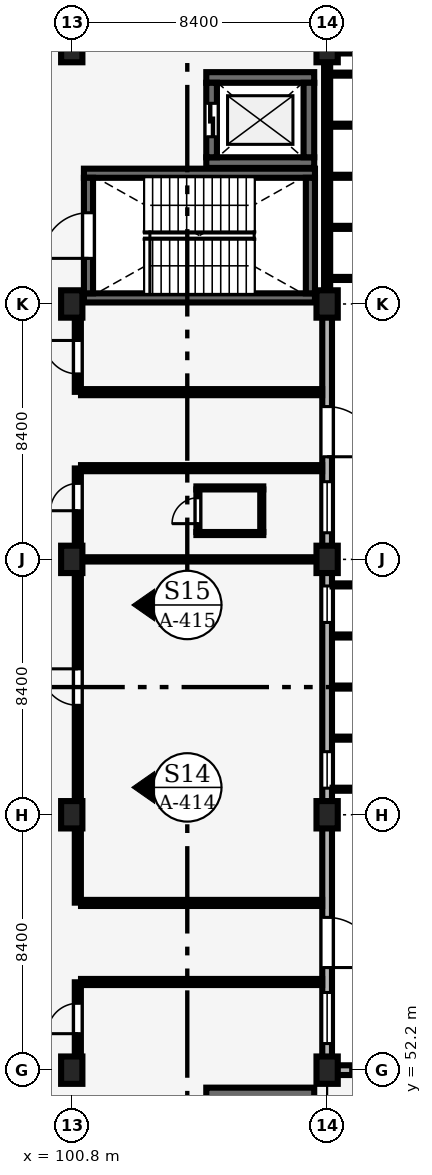
"""IFC4 building model, lengths in metres.
Left out: names, types, materials, properties, quantities, classifications, styles, units other than length and angle.
Written with IfcOpenShell. Run it as: python <this file> out.ifc"""

import sys

from ifc_helpers import new_model, si_unit, direction, frame, frame_2d, origin, origin_2d, place, context, subcontext, project, spatial, rectangle, extrude, element, fill, save


model = new_model("IFC4")
c1 = context("Model", 3, precision=1e-05, world=origin(), true_north=direction((0.0, 1.0)))
c2 = subcontext(c1, "Body", "Model", "MODEL_VIEW")
j1 = project(units=[si_unit("LENGTHUNIT", "METRE"), si_unit("PLANEANGLEUNIT", "RADIAN")], contexts=[c1])
p1 = place(None, origin())
s1 = spatial("IfcSite", under=j1, at=p1, CompositionType="ELEMENT")
p2 = place(p1, origin())
s2 = spatial("IfcBuilding", under=s1, at=p2, CompositionType="ELEMENT")
p3 = place(p2, origin())
s3 = spatial("IfcBuildingStorey", under=s2, at=p3, CompositionType="ELEMENT", Elevation=0.0)
for number, where, z_axis, x_axis in (
    (1, (100.8, 52.2, 0.0), (0.0, 0.0, 1.0), (1.0, 0.0, 0.0)),
    (2, (100.8, 60.6, 0.0), (0.0, 0.0, 1.0), (1.0, 0.0, 0.0)),
    (3, (100.8, 69.0, 0.0), (0.0, 0.0, 1.0), (1.0, 0.0, 0.0)),
    (4, (100.8, 77.4, 0.0), (0.0, 0.0, 1.0), (1.0, 0.0, 0.0)),
    (5, (100.8, 85.8, 0.0), (0.0, 0.0, 1.0), (1.0, 0.0, 0.0)),
    (6, (109.2, 52.2, 0.0), (0.0, 0.0, 1.0), (1.0, 0.0, 0.0)),
    (7, (109.2, 60.6, 0.0), (0.0, 0.0, 1.0), (1.0, 0.0, 0.0)),
    (8, (109.2, 69.0, 0.0), (0.0, 0.0, 1.0), (1.0, 0.0, 0.0)),
    (9, (109.2, 77.4, 0.0), (0.0, 0.0, 1.0), (1.0, 0.0, 0.0)),
    (10, (109.2, 85.8, 0.0), (0.0, 0.0, 1.0), (1.0, 0.0, 0.0)),
):
    element("IfcColumn", number, at=place(p3, frame(where, z_axis=z_axis, x_axis=x_axis)), inside=s3, PredefinedType="COLUMN", context=c2, shape_type="SweptSolid", body=[
        extrude(rectangle(XDim=0.7, YDim=0.9, at=origin_2d()), origin(), (0.0, 0.0, 1.0), 4.8),
    ])
p4 = place(p3, frame((109.525, 52.2, 0.0), z_axis=(0.0, 0.0, 1.0), x_axis=(1.0, 0.0, 0.0)))
e11 = element("IfcWall", 11, at=p4, inside=s3, PredefinedType="SOLIDWALL", context=c2, shape_type="SweptSolid", body=[
    extrude(rectangle(XDim=7.85, YDim=0.32, at=frame_2d((3.925, 0.0))), origin(), (0.0, 0.0, 1.0), 4.03),
])
p5 = place(p4, frame((0.45, 0.0, 0.9)))
e12 = element("IfcOpeningElement", 12, at=p5, cuts=e11, PredefinedType="OPENING", context=c2, shape_type="SweptSolid", body=[
    extrude(rectangle(XDim=1.2, YDim=1.5, at=frame_2d((0.6, 0.75))), frame((0.0, 0.17, 0.0), z_axis=(0.0, -1.0, 0.0), x_axis=(1.0, 0.0, 0.0)), (0.0, 0.0, 1.0), 0.34),
])
p6 = place(p4, frame((6.2, 0.0, 0.9)))
e13 = element("IfcOpeningElement", 13, at=p6, cuts=e11, PredefinedType="OPENING", context=c2, shape_type="SweptSolid", body=[
    extrude(rectangle(XDim=1.2, YDim=1.8, at=frame_2d((0.6, 0.9))), frame((0.0, 0.17, 0.0), z_axis=(0.0, -1.0, 0.0), x_axis=(1.0, 0.0, 0.0)), (0.0, 0.0, 1.0), 0.34),
])
p7 = place(p3, frame((109.2, 52.625, 0.0), z_axis=(0.0, 0.0, 1.0), x_axis=(0.0, 1.0, 0.0)))
e14 = element("IfcWall", 14, at=p7, inside=s3, PredefinedType="SOLIDWALL", context=c2, shape_type="SweptSolid", body=[
    extrude(rectangle(XDim=7.55, YDim=0.32, at=frame_2d((3.775, 0.0))), origin(), (0.0, 0.0, 1.0), 3.89),
])
p8 = place(p7, frame((4.6, 0.0, 0.0), z_axis=(0.0, 0.0, 1.0), x_axis=(-1.0, 0.0, 0.0)))
e15 = element("IfcOpeningElement", 15, at=p8, cuts=e14, PredefinedType="OPENING", context=c2, shape_type="SweptSolid", body=[
    extrude(rectangle(XDim=1.65, YDim=2.25, at=frame_2d((0.825, 1.125))), frame((0.0, 0.17, 0.0), z_axis=(0.0, -1.0, 0.0), x_axis=(1.0, 0.0, 0.0)), (0.0, 0.0, 1.0), 0.34),
])
p9 = place(p7, frame((0.45, 0.0, 0.95)))
e16 = element("IfcOpeningElement", 16, at=p9, cuts=e14, PredefinedType="OPENING", context=c2, shape_type="SweptSolid", body=[
    extrude(rectangle(XDim=1.68, YDim=2.1, at=frame_2d((0.84, 1.05))), frame((0.0, 0.17, 0.0), z_axis=(0.0, -1.0, 0.0), x_axis=(1.0, 0.0, 0.0)), (0.0, 0.0, 1.0), 0.34),
])
p10 = place(p3, frame((109.2, 61.025, 0.0), z_axis=(0.0, 0.0, 1.0), x_axis=(0.0, 1.0, 0.0)))
e17 = element("IfcWall", 17, at=p10, inside=s3, PredefinedType="SOLIDWALL", context=c2, shape_type="SweptSolid", body=[
    extrude(rectangle(XDim=7.55, YDim=0.32, at=frame_2d((3.775, 0.0))), origin(), (0.0, 0.0, 1.0), 3.84),
])
p11 = place(p10, frame((0.45, 0.0, 0.85)))
e18 = element("IfcOpeningElement", 18, at=p11, cuts=e17, PredefinedType="OPENING", context=c2, shape_type="SweptSolid", body=[
    extrude(rectangle(XDim=1.2, YDim=1.8, at=frame_2d((0.6, 0.9))), frame((0.0, 0.17, 0.0), z_axis=(0.0, -1.0, 0.0), x_axis=(1.0, 0.0, 0.0)), (0.0, 0.0, 1.0), 0.34),
])
p12 = place(p10, frame((5.9, 0.0, 0.85)))
e19 = element("IfcOpeningElement", 19, at=p12, cuts=e17, PredefinedType="OPENING", context=c2, shape_type="SweptSolid", body=[
    extrude(rectangle(XDim=1.2, YDim=1.8, at=frame_2d((0.6, 0.9))), frame((0.0, 0.17, 0.0), z_axis=(0.0, -1.0, 0.0), x_axis=(1.0, 0.0, 0.0)), (0.0, 0.0, 1.0), 0.34),
])
p13 = place(p3, frame((109.2, 69.425, 0.0), z_axis=(0.0, 0.0, 1.0), x_axis=(0.0, 1.0, 0.0)))
e20 = element("IfcWall", 20, at=p13, inside=s3, PredefinedType="SOLIDWALL", context=c2, shape_type="SweptSolid", body=[
    extrude(rectangle(XDim=7.55, YDim=0.32, at=frame_2d((3.775, 0.0))), origin(), (0.0, 0.0, 1.0), 3.89),
])
p14 = place(p13, frame((4.6, 0.0, 0.0), z_axis=(0.0, 0.0, 1.0), x_axis=(-1.0, 0.0, 0.0)))
e21 = element("IfcOpeningElement", 21, at=p14, cuts=e20, PredefinedType="OPENING", context=c2, shape_type="SweptSolid", body=[
    extrude(rectangle(XDim=1.65, YDim=2.25, at=frame_2d((0.825, 1.125))), frame((0.0, 0.17, 0.0), z_axis=(0.0, -1.0, 0.0), x_axis=(1.0, 0.0, 0.0)), (0.0, 0.0, 1.0), 0.34),
])
p15 = place(p13, frame((0.45, 0.0, 0.95)))
e22 = element("IfcOpeningElement", 22, at=p15, cuts=e20, PredefinedType="OPENING", context=c2, shape_type="SweptSolid", body=[
    extrude(rectangle(XDim=1.68, YDim=2.1, at=frame_2d((0.84, 1.05))), frame((0.0, 0.17, 0.0), z_axis=(0.0, -1.0, 0.0), x_axis=(1.0, 0.0, 0.0)), (0.0, 0.0, 1.0), 0.34),
])
p16 = place(p3, frame((109.525, 85.8, 0.0), z_axis=(0.0, 0.0, 1.0), x_axis=(1.0, 0.0, 0.0)))
e23 = element("IfcWall", 23, at=p16, inside=s3, PredefinedType="SOLIDWALL", context=c2, shape_type="SweptSolid", body=[
    extrude(rectangle(XDim=7.85, YDim=0.32, at=frame_2d((3.925, 0.0))), origin(), (0.0, 0.0, 1.0), 3.92),
])
p17 = place(p16, frame((0.45, 0.0, 0.9)))
e24 = element("IfcOpeningElement", 24, at=p17, cuts=e23, PredefinedType="OPENING", context=c2, shape_type="SweptSolid", body=[
    extrude(rectangle(XDim=1.68, YDim=2.4, at=frame_2d((0.84, 1.2))), frame((0.0, 0.17, 0.0), z_axis=(0.0, -1.0, 0.0), x_axis=(1.0, 0.0, 0.0)), (0.0, 0.0, 1.0), 0.34),
])
p18 = place(p16, frame((6.2, 0.0, 0.9)))
e25 = element("IfcOpeningElement", 25, at=p18, cuts=e23, PredefinedType="OPENING", context=c2, shape_type="SweptSolid", body=[
    extrude(rectangle(XDim=1.2, YDim=1.5, at=frame_2d((0.6, 0.75))), frame((0.0, 0.17, 0.0), z_axis=(0.0, -1.0, 0.0), x_axis=(1.0, 0.0, 0.0)), (0.0, 0.0, 1.0), 0.34),
])
p19 = place(p3, frame((105.225, 51.45, 0.0), z_axis=(0.0, 0.0, 1.0), x_axis=(1.0, 0.0, 0.0)))
e26 = element("IfcWall", 26, at=p19, inside=s3, PredefinedType="SHEAR", context=c2, shape_type="SweptSolid", body=[
    extrude(rectangle(XDim=3.55, YDim=0.35, at=frame_2d((1.775, 0.0))), origin(), (0.0, 0.0, 1.0), 4.52),
])
for number, where, z_axis, x_axis in (
    (27, (101.2, 77.6, 0.0), (0.0, 0.0, 1.0), (1.0, 0.0, 0.0)),
    (28, (101.2, 81.7, 0.0), (0.0, 0.0, 1.0), (1.0, 0.0, 0.0)),
):
    element("IfcWall", number, at=place(p3, frame(where, z_axis=z_axis, x_axis=x_axis)), inside=s3, PredefinedType="SHEAR", context=c2, shape_type="SweptSolid", body=[
        extrude(rectangle(XDim=7.6, YDim=0.3, at=frame_2d((3.8, 0.0))), origin(), (0.0, 0.0, 1.0), 4.625),
    ])
p20 = place(p3, frame((101.35, 77.75, 0.0), z_axis=(0.0, 0.0, 1.0), x_axis=(0.0, 1.0, 0.0)))
e29 = element("IfcWall", 29, at=p20, inside=s3, PredefinedType="SHEAR", context=c2, shape_type="SweptSolid", body=[
    extrude(rectangle(XDim=3.8, YDim=0.3, at=frame_2d((1.9, 0.0))), origin(), (0.0, 0.0, 1.0), 4.625),
])
p21 = place(p20, frame((1.15, 0.0, 0.0)))
e30 = element("IfcOpeningElement", 30, at=p21, cuts=e29, PredefinedType="OPENING", context=c2, shape_type="SweptSolid", body=[
    extrude(rectangle(XDim=1.5, YDim=2.2, at=frame_2d((0.75, 1.1))), frame((0.0, 0.16, 0.0), z_axis=(0.0, -1.0, 0.0), x_axis=(1.0, 0.0, 0.0)), (0.0, 0.0, 1.0), 0.32),
])
p22 = place(p3, frame((108.65, 77.75, 0.0), z_axis=(0.0, 0.0, 1.0), x_axis=(0.0, 1.0, 0.0)))
e31 = element("IfcWall", 31, at=p22, inside=s3, PredefinedType="SHEAR", context=c2, shape_type="SweptSolid", body=[
    extrude(rectangle(XDim=3.8, YDim=0.3, at=frame_2d((1.9, 0.0))), origin(), (0.0, 0.0, 1.0), 4.625),
])
for number, where, z_axis, x_axis in (
    (32, (105.225, 82.05, 0.0), (0.0, 0.0, 1.0), (1.0, 0.0, 0.0)),
    (33, (105.225, 84.85, 0.0), (0.0, 0.0, 1.0), (1.0, 0.0, 0.0)),
):
    element("IfcWall", number, at=place(p3, frame(where, z_axis=z_axis, x_axis=x_axis)), inside=s3, PredefinedType="SHEAR", context=c2, shape_type="SweptSolid", body=[
        extrude(rectangle(XDim=3.55, YDim=0.35, at=frame_2d((1.775, 0.0))), origin(), (0.0, 0.0, 1.0), 4.52),
    ])
p23 = place(p3, frame((105.4, 82.225, 0.0), z_axis=(0.0, 0.0, 1.0), x_axis=(0.0, 1.0, 0.0)))
e34 = element("IfcWall", 34, at=p23, inside=s3, PredefinedType="SHEAR", context=c2, shape_type="SweptSolid", body=[
    extrude(rectangle(XDim=2.45, YDim=0.35, at=frame_2d((1.225, 0.0))), origin(), (0.0, 0.0, 1.0), 4.52),
])
p24 = place(p23, frame((0.675, 0.0, 0.0)))
e35 = element("IfcOpeningElement", 35, at=p24, cuts=e34, PredefinedType="OPENING", context=c2, shape_type="SweptSolid", body=[
    extrude(rectangle(XDim=1.1, YDim=2.2, at=frame_2d((0.55, 1.1))), frame((0.0, 0.185, 0.0), z_axis=(0.0, -1.0, 0.0), x_axis=(1.0, 0.0, 0.0)), (0.0, 0.0, 1.0), 0.37),
])
p25 = place(p3, frame((108.6, 82.225, 0.0), z_axis=(0.0, 0.0, 1.0), x_axis=(0.0, 1.0, 0.0)))
e36 = element("IfcWall", 36, at=p25, inside=s3, PredefinedType="SHEAR", context=c2, shape_type="SweptSolid", body=[
    extrude(rectangle(XDim=2.45, YDim=0.35, at=frame_2d((1.225, 0.0))), origin(), (0.0, 0.0, 1.0), 4.52),
])
for number, where, z_axis, x_axis in (
    (37, (104.9, 69.85, 0.0), (0.0, 0.0, 1.0), (1.0, 0.0, 0.0)),
    (38, (104.9, 71.35, 0.0), (0.0, 0.0, 1.0), (1.0, 0.0, 0.0)),
):
    element("IfcWall", number, at=place(p3, frame(where, z_axis=z_axis, x_axis=x_axis)), inside=s3, PredefinedType="PARTITIONING", context=c2, shape_type="SweptSolid", body=[
        extrude(rectangle(XDim=2.2, YDim=0.1, at=frame_2d((1.1, 0.0))), origin(), (0.0, 0.0, 1.0), 4.5),
    ])
p26 = place(p3, frame((104.95, 69.9, 0.0), z_axis=(0.0, 0.0, 1.0), x_axis=(0.0, 1.0, 0.0)))
e39 = element("IfcWall", 39, at=p26, inside=s3, PredefinedType="PARTITIONING", context=c2, shape_type="SweptSolid", body=[
    extrude(rectangle(XDim=1.4, YDim=0.1, at=frame_2d((0.7, 0.0))), origin(), (0.0, 0.0, 1.0), 4.5),
])
p27 = place(p26, frame((0.275, 0.0, 0.0)))
e40 = element("IfcOpeningElement", 40, at=p27, cuts=e39, PredefinedType="OPENING", context=c2, shape_type="SweptSolid", body=[
    extrude(rectangle(XDim=0.85, YDim=2.05, at=frame_2d((0.425, 1.025))), frame((0.0, 0.06, 0.0), z_axis=(0.0, -1.0, 0.0), x_axis=(1.0, 0.0, 0.0)), (0.0, 0.0, 1.0), 0.12),
])
p28 = place(p3, frame((107.05, 69.9, 0.0), z_axis=(0.0, 0.0, 1.0), x_axis=(0.0, 1.0, 0.0)))
e41 = element("IfcWall", 41, at=p28, inside=s3, PredefinedType="PARTITIONING", context=c2, shape_type="SweptSolid", body=[
    extrude(rectangle(XDim=1.4, YDim=0.1, at=frame_2d((0.7, 0.0))), origin(), (0.0, 0.0, 1.0), 4.5),
])
p29 = place(p3, frame((101.0, 52.66, 0.0), z_axis=(0.0, 0.0, 1.0), x_axis=(0.0, 1.0, 0.0)))
e42 = element("IfcWall", 42, at=p29, inside=s3, PredefinedType="PARTITIONING", context=c2, shape_type="SweptSolid", body=[
    extrude(rectangle(XDim=2.43, YDim=0.2, at=frame_2d((1.215, 0.0))), origin(), (0.0, 0.0, 1.0), 3.74),
])
p30 = place(p29, frame((0.74, 0.0, 0.0)))
e43 = element("IfcOpeningElement", 43, at=p30, cuts=e42, PredefinedType="OPENING", context=c2, shape_type="SweptSolid", body=[
    extrude(rectangle(XDim=1.0, YDim=2.25, at=frame_2d((0.5, 1.125))), frame((0.0, 0.11, 0.0), z_axis=(0.0, -1.0, 0.0), x_axis=(1.0, 0.0, 0.0)), (0.0, 0.0, 1.0), 0.22),
])
for number, where, z_axis, x_axis in (
    (44, (101.105, 55.1, 0.0), (0.0, 0.0, 1.0), (1.0, 0.0, 0.0)),
    (45, (101.105, 57.7, 0.0), (0.0, 0.0, 1.0), (1.0, 0.0, 0.0)),
):
    element("IfcWall", number, at=place(p3, frame(where, z_axis=z_axis, x_axis=x_axis)), inside=s3, PredefinedType="PARTITIONING", context=c2, shape_type="SweptSolid", body=[
        extrude(rectangle(XDim=7.93, YDim=0.2, at=frame_2d((3.965, 0.0))), origin(), (0.0, 0.0, 1.0), 4.06),
    ])
p31 = place(p3, frame((101.105, 69.0, 0.0), z_axis=(0.0, 0.0, 1.0), x_axis=(1.0, 0.0, 0.0)))
e46 = element("IfcWall", 46, at=p31, inside=s3, PredefinedType="PARTITIONING", context=c2, shape_type="SweptSolid", body=[
    extrude(rectangle(XDim=7.93, YDim=0.14, at=frame_2d((3.965, 0.0))), origin(), (0.0, 0.0, 1.0), 3.89),
])
p32 = place(p3, frame((101.0, 57.71, 0.0), z_axis=(0.0, 0.0, 1.0), x_axis=(0.0, 1.0, 0.0)))
e47 = element("IfcWall", 47, at=p32, inside=s3, PredefinedType="PARTITIONING", context=c2, shape_type="SweptSolid", body=[
    extrude(rectangle(XDim=2.43, YDim=0.2, at=frame_2d((1.215, 0.0))), origin(), (0.0, 0.0, 1.0), 3.74),
])
p33 = place(p3, frame((101.0, 61.06, 0.0), z_axis=(0.0, 0.0, 1.0), x_axis=(0.0, 1.0, 0.0)))
e48 = element("IfcWall", 48, at=p33, inside=s3, PredefinedType="PARTITIONING", context=c2, shape_type="SweptSolid", body=[
    extrude(rectangle(XDim=7.48, YDim=0.2, at=frame_2d((3.74, 0.0))), origin(), (0.0, 0.0, 1.0), 3.79),
])
p34 = place(p33, frame((3.14, 0.0, 0.0)))
e49 = element("IfcOpeningElement", 49, at=p34, cuts=e48, PredefinedType="OPENING", context=c2, shape_type="SweptSolid", body=[
    extrude(rectangle(XDim=1.2, YDim=2.2, at=frame_2d((0.6, 1.1))), frame((0.0, 0.11, 0.0), z_axis=(0.0, -1.0, 0.0), x_axis=(1.0, 0.0, 0.0)), (0.0, 0.0, 1.0), 0.22),
])
p35 = place(p3, frame((101.0, 69.46, 0.0), z_axis=(0.0, 0.0, 1.0), x_axis=(0.0, 1.0, 0.0)))
e50 = element("IfcWall", 50, at=p35, inside=s3, PredefinedType="PARTITIONING", context=c2, shape_type="SweptSolid", body=[
    extrude(rectangle(XDim=2.53, YDim=0.2, at=frame_2d((1.265, 0.0))), origin(), (0.0, 0.0, 1.0), 3.74),
])
p36 = place(p35, frame((1.14, 0.0, 0.0)))
e51 = element("IfcOpeningElement", 51, at=p36, cuts=e50, PredefinedType="OPENING", context=c2, shape_type="SweptSolid", body=[
    extrude(rectangle(XDim=0.9, YDim=2.1, at=frame_2d((0.45, 1.05))), frame((0.0, 0.11, 0.0), z_axis=(0.0, -1.0, 0.0), x_axis=(1.0, 0.0, 0.0)), (0.0, 0.0, 1.0), 0.22),
])
for number, where, z_axis, x_axis in (
    (52, (101.105, 72.0, 0.0), (0.0, 0.0, 1.0), (1.0, 0.0, 0.0)),
    (53, (101.105, 74.5, 0.0), (0.0, 0.0, 1.0), (1.0, 0.0, 0.0)),
):
    element("IfcWall", number, at=place(p3, frame(where, z_axis=z_axis, x_axis=x_axis)), inside=s3, PredefinedType="PARTITIONING", context=c2, shape_type="SweptSolid", body=[
        extrude(rectangle(XDim=7.93, YDim=0.2, at=frame_2d((3.965, 0.0))), origin(), (0.0, 0.0, 1.0), 4.06),
    ])
p37 = place(p3, frame((101.0, 74.51, 0.0), z_axis=(0.0, 0.0, 1.0), x_axis=(0.0, 1.0, 0.0)))
e54 = element("IfcWall", 54, at=p37, inside=s3, PredefinedType="PARTITIONING", context=c2, shape_type="SweptSolid", body=[
    extrude(rectangle(XDim=2.43, YDim=0.2, at=frame_2d((1.215, 0.0))), origin(), (0.0, 0.0, 1.0), 3.74),
])
p38 = place(p37, frame((0.59, 0.0, 0.0)))
e55 = element("IfcOpeningElement", 55, at=p38, cuts=e54, PredefinedType="OPENING", context=c2, shape_type="SweptSolid", body=[
    extrude(rectangle(XDim=1.1, YDim=2.15, at=frame_2d((0.55, 1.075))), frame((0.0, 0.11, 0.0), z_axis=(0.0, -1.0, 0.0), x_axis=(1.0, 0.0, 0.0)), (0.0, 0.0, 1.0), 0.22),
])
p39 = place(p5, origin())
e56 = element("IfcWindow", 56, at=p39, inside=s3, PartitioningType="SINGLE_PANEL", PredefinedType="WINDOW", context=c2, shape_type="SweptSolid", body=[
    extrude(rectangle(XDim=1.2, YDim=1.5, at=frame_2d((0.6, 0.75))), frame((0.0, 0.03, 0.0), z_axis=(0.0, -1.0, 0.0), x_axis=(1.0, 0.0, 0.0)), (0.0, 0.0, 1.0), 0.06),
])
fill(e12, e56)
p40 = place(p8, origin())
e57 = element("IfcDoor", 57, at=p40, inside=s3, OperationType="DOUBLE_DOOR_SINGLE_SWING", PredefinedType="DOOR", context=c2, shape_type="SweptSolid", body=[
    extrude(rectangle(XDim=1.65, YDim=2.25, at=frame_2d((0.825, 1.125))), frame((0.0, 0.025, 0.0), z_axis=(0.0, -1.0, 0.0), x_axis=(1.0, 0.0, 0.0)), (0.0, 0.0, 1.0), 0.05),
])
fill(e15, e57)
p41 = place(p9, origin())
e58 = element("IfcWindow", 58, at=p41, inside=s3, PartitioningType="SINGLE_PANEL", PredefinedType="WINDOW", context=c2, shape_type="SweptSolid", body=[
    extrude(rectangle(XDim=1.68, YDim=2.1, at=frame_2d((0.84, 1.05))), frame((0.0, 0.03, 0.0), z_axis=(0.0, -1.0, 0.0), x_axis=(1.0, 0.0, 0.0)), (0.0, 0.0, 1.0), 0.06),
])
fill(e16, e58)
p42 = place(p11, origin())
e59 = element("IfcWindow", 59, at=p42, inside=s3, PartitioningType="SINGLE_PANEL", PredefinedType="WINDOW", context=c2, shape_type="SweptSolid", body=[
    extrude(rectangle(XDim=1.2, YDim=1.8, at=frame_2d((0.6, 0.9))), frame((0.0, 0.03, 0.0), z_axis=(0.0, -1.0, 0.0), x_axis=(1.0, 0.0, 0.0)), (0.0, 0.0, 1.0), 0.06),
])
fill(e18, e59)
p43 = place(p12, origin())
e60 = element("IfcWindow", 60, at=p43, inside=s3, PartitioningType="SINGLE_PANEL", PredefinedType="WINDOW", context=c2, shape_type="SweptSolid", body=[
    extrude(rectangle(XDim=1.2, YDim=1.8, at=frame_2d((0.6, 0.9))), frame((0.0, 0.03, 0.0), z_axis=(0.0, -1.0, 0.0), x_axis=(1.0, 0.0, 0.0)), (0.0, 0.0, 1.0), 0.06),
])
fill(e19, e60)
p44 = place(p14, origin())
e61 = element("IfcDoor", 61, at=p44, inside=s3, OperationType="DOUBLE_DOOR_SINGLE_SWING", PredefinedType="DOOR", context=c2, shape_type="SweptSolid", body=[
    extrude(rectangle(XDim=1.65, YDim=2.25, at=frame_2d((0.825, 1.125))), frame((0.0, 0.025, 0.0), z_axis=(0.0, -1.0, 0.0), x_axis=(1.0, 0.0, 0.0)), (0.0, 0.0, 1.0), 0.05),
])
fill(e21, e61)
p45 = place(p15, origin())
e62 = element("IfcWindow", 62, at=p45, inside=s3, PartitioningType="SINGLE_PANEL", PredefinedType="WINDOW", context=c2, shape_type="SweptSolid", body=[
    extrude(rectangle(XDim=1.68, YDim=2.1, at=frame_2d((0.84, 1.05))), frame((0.0, 0.03, 0.0), z_axis=(0.0, -1.0, 0.0), x_axis=(1.0, 0.0, 0.0)), (0.0, 0.0, 1.0), 0.06),
])
fill(e22, e62)
p46 = place(p21, origin())
e63 = element("IfcDoor", 63, at=p46, inside=s3, OperationType="DOUBLE_DOOR_SINGLE_SWING", PredefinedType="DOOR", context=c2, shape_type="SweptSolid", body=[
    extrude(rectangle(XDim=1.5, YDim=2.2, at=frame_2d((0.75, 1.1))), frame((0.0, 0.025, 0.0), z_axis=(0.0, -1.0, 0.0), x_axis=(1.0, 0.0, 0.0)), (0.0, 0.0, 1.0), 0.05),
])
fill(e30, e63)
p47 = place(p24, origin())
e64 = element("IfcDoor", 64, at=p47, inside=s3, OperationType="DOUBLE_DOOR_SLIDING", PredefinedType="DOOR", context=c2, shape_type="SweptSolid", body=[
    extrude(rectangle(XDim=1.1, YDim=2.2, at=frame_2d((0.55, 1.1))), frame((0.0, 0.025, 0.0), z_axis=(0.0, -1.0, 0.0), x_axis=(1.0, 0.0, 0.0)), (0.0, 0.0, 1.0), 0.05),
])
fill(e35, e64)
p48 = place(p27, origin())
e65 = element("IfcDoor", 65, at=p48, inside=s3, OperationType="SINGLE_SWING_LEFT", PredefinedType="DOOR", context=c2, shape_type="SweptSolid", body=[
    extrude(rectangle(XDim=0.85, YDim=2.05, at=frame_2d((0.425, 1.025))), frame((0.0, 0.025, 0.0), z_axis=(0.0, -1.0, 0.0), x_axis=(1.0, 0.0, 0.0)), (0.0, 0.0, 1.0), 0.05),
])
fill(e40, e65)
p49 = place(p30, origin())
e66 = element("IfcDoor", 66, at=p49, inside=s3, OperationType="SINGLE_SWING_LEFT", PredefinedType="DOOR", context=c2, shape_type="SweptSolid", body=[
    extrude(rectangle(XDim=1.0, YDim=2.25, at=frame_2d((0.5, 1.125))), frame((0.0, 0.025, 0.0), z_axis=(0.0, -1.0, 0.0), x_axis=(1.0, 0.0, 0.0)), (0.0, 0.0, 1.0), 0.05),
])
fill(e43, e66)
p50 = place(p34, origin())
e67 = element("IfcDoor", 67, at=p50, inside=s3, OperationType="SINGLE_SWING_RIGHT", PredefinedType="DOOR", context=c2, shape_type="SweptSolid", body=[
    extrude(rectangle(XDim=1.2, YDim=2.2, at=frame_2d((0.6, 1.1))), frame((0.0, 0.025, 0.0), z_axis=(0.0, -1.0, 0.0), x_axis=(1.0, 0.0, 0.0)), (0.0, 0.0, 1.0), 0.05),
])
fill(e49, e67)
p51 = place(p36, origin())
e68 = element("IfcDoor", 68, at=p51, inside=s3, OperationType="SINGLE_SWING_LEFT", PredefinedType="DOOR", context=c2, shape_type="SweptSolid", body=[
    extrude(rectangle(XDim=0.9, YDim=2.1, at=frame_2d((0.45, 1.05))), frame((0.0, 0.025, 0.0), z_axis=(0.0, -1.0, 0.0), x_axis=(1.0, 0.0, 0.0)), (0.0, 0.0, 1.0), 0.05),
])
fill(e51, e68)
p52 = place(p38, origin())
e69 = element("IfcDoor", 69, at=p52, inside=s3, OperationType="SINGLE_SWING_RIGHT", PredefinedType="DOOR", context=c2, shape_type="SweptSolid", body=[
    extrude(rectangle(XDim=1.1, YDim=2.15, at=frame_2d((0.55, 1.075))), frame((0.0, 0.025, 0.0), z_axis=(0.0, -1.0, 0.0), x_axis=(1.0, 0.0, 0.0)), (0.0, 0.0, 1.0), 0.05),
])
fill(e55, e69)
save(model, sys.argv[1])
